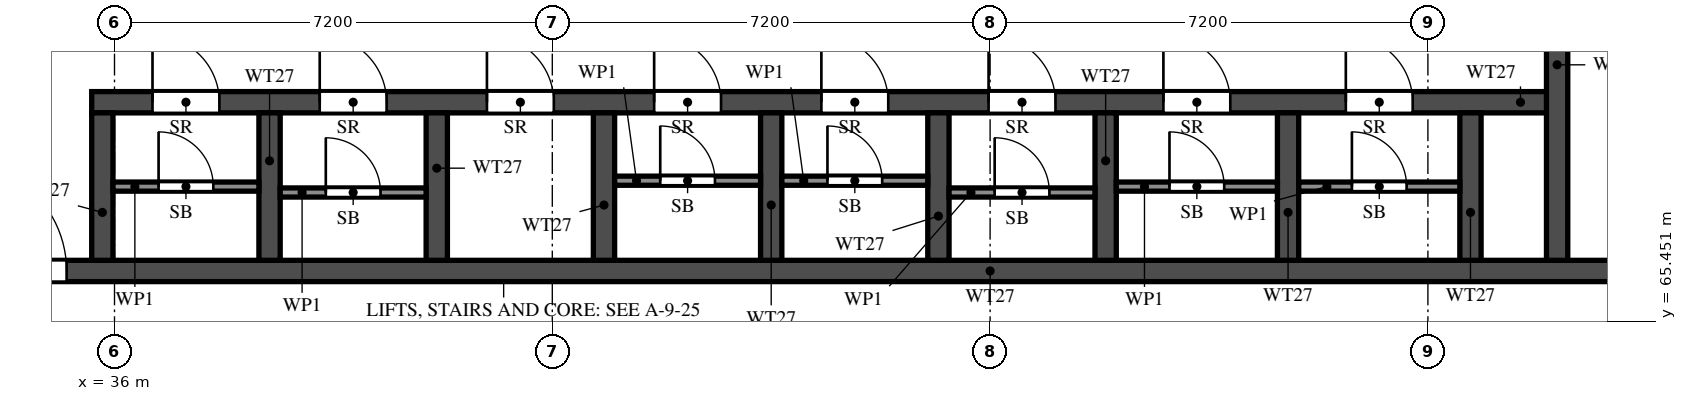
"""IFC4 building model, lengths in metres.
Left out: names, types, materials, properties, quantities, classifications, styles, units other than length and angle.
Written with IfcOpenShell. Run it as: python <this file> out.ifc"""

import sys

from ifc_helpers import new_model, si_unit, direction, frame, frame_2d, origin, place, context, subcontext, project, spatial, rectangle, extrude, element, fill, save


model = new_model("IFC4")
c1 = context("Model", 3, precision=1e-05, world=origin(), true_north=direction((0.0, 1.0)))
c2 = subcontext(c1, "Body", "Model", "MODEL_VIEW")
j1 = project(units=[si_unit("LENGTHUNIT", "METRE"), si_unit("PLANEANGLEUNIT", "RADIAN")], contexts=[c1])
p1 = place(None, origin())
s1 = spatial("IfcSite", under=j1, at=p1, CompositionType="ELEMENT")
p2 = place(p1, origin())
s2 = spatial("IfcBuilding", under=s1, at=p2, CompositionType="ELEMENT")
p3 = place(p2, frame((0.0, 0.0, 192.0)))
s3 = spatial("IfcBuildingStorey", under=s2, at=p3, CompositionType="ELEMENT", Elevation=192.0)
p4 = place(p3, frame((29.7, 66.275, 0.0), z_axis=(0.0, 0.0, 1.0), x_axis=(1.0, 0.0, 0.0)))
e1 = element("IfcWall", 1, at=p4, inside=s3, PredefinedType="SHEAR", context=c2, shape_type="SweptSolid", body=[
    extrude(rectangle(XDim=41.4, YDim=0.35, at=frame_2d((20.7, 0.0))), origin(), (0.0, 0.0, 1.0), 3.2),
])
p5 = place(p4, frame((0.925, 0.0, 0.0)))
e2 = element("IfcOpeningElement", 2, at=p5, cuts=e1, PredefinedType="OPENING", context=c2, shape_type="SweptSolid", body=[
    extrude(rectangle(XDim=1.1, YDim=2.1, at=frame_2d((0.55, 1.05))), frame((0.0, 0.185, 0.0), z_axis=(0.0, -1.0, 0.0), x_axis=(1.0, 0.0, 0.0)), (0.0, 0.0, 1.0), 0.37),
])
p6 = place(p4, frame((3.712, 0.0, 0.0)))
e3 = element("IfcOpeningElement", 3, at=p6, cuts=e1, PredefinedType="OPENING", context=c2, shape_type="SweptSolid", body=[
    extrude(rectangle(XDim=1.8, YDim=2.1, at=frame_2d((0.9, 1.05))), frame((0.0, 0.185, 0.0), z_axis=(0.0, -1.0, 0.0), x_axis=(1.0, 0.0, 0.0)), (0.0, 0.0, 1.0), 0.37),
])
p7 = place(p3, frame((35.625, 69.05, 0.0), z_axis=(0.0, 0.0, 1.0), x_axis=(1.0, 0.0, 0.0)))
e4 = element("IfcWall", 4, at=p7, inside=s3, PredefinedType="SHEAR", context=c2, shape_type="SweptSolid", body=[
    extrude(rectangle(XDim=24.1, YDim=0.35, at=frame_2d((12.05, 0.0))), origin(), (0.0, 0.0, 1.0), 3.2),
])
p8 = place(p7, frame((1.0, 0.0, 0.0)))
e5 = element("IfcOpeningElement", 5, at=p8, cuts=e4, PredefinedType="OPENING", context=c2, shape_type="SweptSolid", body=[
    extrude(rectangle(XDim=1.1, YDim=2.1, at=frame_2d((0.55, 1.05))), frame((0.0, 0.185, 0.0), z_axis=(0.0, -1.0, 0.0), x_axis=(1.0, 0.0, 0.0)), (0.0, 0.0, 1.0), 0.37),
])
p9 = place(p7, frame((3.75, 0.0, 0.0)))
e6 = element("IfcOpeningElement", 6, at=p9, cuts=e4, PredefinedType="OPENING", context=c2, shape_type="SweptSolid", body=[
    extrude(rectangle(XDim=1.1, YDim=2.1, at=frame_2d((0.55, 1.05))), frame((0.0, 0.185, 0.0), z_axis=(0.0, -1.0, 0.0), x_axis=(1.0, 0.0, 0.0)), (0.0, 0.0, 1.0), 0.37),
])
p10 = place(p7, frame((6.5, 0.0, 0.0)))
e7 = element("IfcOpeningElement", 7, at=p10, cuts=e4, PredefinedType="OPENING", context=c2, shape_type="SweptSolid", body=[
    extrude(rectangle(XDim=1.1, YDim=2.1, at=frame_2d((0.55, 1.05))), frame((0.0, 0.185, 0.0), z_axis=(0.0, -1.0, 0.0), x_axis=(1.0, 0.0, 0.0)), (0.0, 0.0, 1.0), 0.37),
])
p11 = place(p7, frame((9.25, 0.0, 0.0)))
e8 = element("IfcOpeningElement", 8, at=p11, cuts=e4, PredefinedType="OPENING", context=c2, shape_type="SweptSolid", body=[
    extrude(rectangle(XDim=1.1, YDim=2.1, at=frame_2d((0.55, 1.05))), frame((0.0, 0.185, 0.0), z_axis=(0.0, -1.0, 0.0), x_axis=(1.0, 0.0, 0.0)), (0.0, 0.0, 1.0), 0.37),
])
p12 = place(p7, frame((12.0, 0.0, 0.0)))
e9 = element("IfcOpeningElement", 9, at=p12, cuts=e4, PredefinedType="OPENING", context=c2, shape_type="SweptSolid", body=[
    extrude(rectangle(XDim=1.1, YDim=2.1, at=frame_2d((0.55, 1.05))), frame((0.0, 0.185, 0.0), z_axis=(0.0, -1.0, 0.0), x_axis=(1.0, 0.0, 0.0)), (0.0, 0.0, 1.0), 0.37),
])
p13 = place(p7, frame((14.75, 0.0, 0.0)))
e10 = element("IfcOpeningElement", 10, at=p13, cuts=e4, PredefinedType="OPENING", context=c2, shape_type="SweptSolid", body=[
    extrude(rectangle(XDim=1.1, YDim=2.1, at=frame_2d((0.55, 1.05))), frame((0.0, 0.185, 0.0), z_axis=(0.0, -1.0, 0.0), x_axis=(1.0, 0.0, 0.0)), (0.0, 0.0, 1.0), 0.37),
])
p14 = place(p7, frame((17.625, 0.0, 0.0)))
e11 = element("IfcOpeningElement", 11, at=p14, cuts=e4, PredefinedType="OPENING", context=c2, shape_type="SweptSolid", body=[
    extrude(rectangle(XDim=1.1, YDim=2.1, at=frame_2d((0.55, 1.05))), frame((0.0, 0.185, 0.0), z_axis=(0.0, -1.0, 0.0), x_axis=(1.0, 0.0, 0.0)), (0.0, 0.0, 1.0), 0.37),
])
p15 = place(p7, frame((20.625, 0.0, 0.0)))
e12 = element("IfcOpeningElement", 12, at=p15, cuts=e4, PredefinedType="OPENING", context=c2, shape_type="SweptSolid", body=[
    extrude(rectangle(XDim=1.1, YDim=2.1, at=frame_2d((0.55, 1.05))), frame((0.0, 0.185, 0.0), z_axis=(0.0, -1.0, 0.0), x_axis=(1.0, 0.0, 0.0)), (0.0, 0.0, 1.0), 0.37),
])
p16 = place(p3, frame((59.725, 66.45, 0.0), z_axis=(0.0, 0.0, 1.0), x_axis=(0.0, 1.0, 0.0)))
e13 = element("IfcWall", 13, at=p16, inside=s3, PredefinedType="SHEAR", context=c2, shape_type="SweptSolid", body=[
    extrude(rectangle(XDim=6.125, YDim=0.35, at=frame_2d((3.062, 0.0))), origin(), (0.0, 0.0, 1.0), 3.2),
])
p17 = place(p16, frame((3.85, 0.0, 0.0)))
e14 = element("IfcOpeningElement", 14, at=p17, cuts=e13, PredefinedType="OPENING", context=c2, shape_type="SweptSolid", body=[
    extrude(rectangle(XDim=1.2, YDim=2.1, at=frame_2d((0.6, 1.05))), frame((0.0, 0.185, 0.0), z_axis=(0.0, -1.0, 0.0), x_axis=(1.0, 0.0, 0.0)), (0.0, 0.0, 1.0), 0.37),
])
for number, where, z_axis, x_axis in (
    (15, (35.8, 66.45, 0.0), (0.0, 0.0, 1.0), (0.0, 1.0, 0.0)),
    (16, (38.55, 66.45, 0.0), (0.0, 0.0, 1.0), (0.0, 1.0, 0.0)),
    (17, (41.3, 66.45, 0.0), (0.0, 0.0, 1.0), (0.0, 1.0, 0.0)),
    (18, (44.05, 66.45, 0.0), (0.0, 0.0, 1.0), (0.0, 1.0, 0.0)),
    (19, (46.8, 66.45, 0.0), (0.0, 0.0, 1.0), (0.0, 1.0, 0.0)),
    (20, (49.55, 66.45, 0.0), (0.0, 0.0, 1.0), (0.0, 1.0, 0.0)),
    (21, (52.3, 66.45, 0.0), (0.0, 0.0, 1.0), (0.0, 1.0, 0.0)),
    (22, (55.3, 66.45, 0.0), (0.0, 0.0, 1.0), (0.0, 1.0, 0.0)),
    (23, (58.3, 66.45, 0.0), (0.0, 0.0, 1.0), (0.0, 1.0, 0.0)),
):
    element("IfcWall", number, at=place(p3, frame(where, z_axis=z_axis, x_axis=x_axis)), inside=s3, PredefinedType="SHEAR", context=c2, shape_type="SweptSolid", body=[
        extrude(rectangle(XDim=2.425, YDim=0.35, at=frame_2d((1.212, 0.0))), origin(), (0.0, 0.0, 1.0), 3.2),
    ])
p18 = place(p3, frame((35.975, 67.663, 0.0), z_axis=(0.0, 0.0, 1.0), x_axis=(1.0, 0.0, 0.0)))
e24 = element("IfcWall", 24, at=p18, inside=s3, PredefinedType="PARTITIONING", context=c2, shape_type="SweptSolid", body=[
    extrude(rectangle(XDim=2.4, YDim=0.15, at=frame_2d((1.2, 0.0))), origin(), (0.0, 0.0, 1.0), 3.2),
])
p19 = place(p18, frame((0.75, 0.0, 0.0)))
e25 = element("IfcOpeningElement", 25, at=p19, cuts=e24, PredefinedType="OPENING", context=c2, shape_type="SweptSolid", body=[
    extrude(rectangle(XDim=0.9, YDim=2.1, at=frame_2d((0.45, 1.05))), frame((0.0, 0.085, 0.0), z_axis=(0.0, -1.0, 0.0), x_axis=(1.0, 0.0, 0.0)), (0.0, 0.0, 1.0), 0.17),
])
p20 = place(p3, frame((38.725, 67.565, 0.0), z_axis=(0.0, 0.0, 1.0), x_axis=(1.0, 0.0, 0.0)))
e26 = element("IfcWall", 26, at=p20, inside=s3, PredefinedType="PARTITIONING", context=c2, shape_type="SweptSolid", body=[
    extrude(rectangle(XDim=2.4, YDim=0.15, at=frame_2d((1.2, 0.0))), origin(), (0.0, 0.0, 1.0), 3.2),
])
p21 = place(p20, frame((0.75, 0.0, 0.0)))
e27 = element("IfcOpeningElement", 27, at=p21, cuts=e26, PredefinedType="OPENING", context=c2, shape_type="SweptSolid", body=[
    extrude(rectangle(XDim=0.9, YDim=2.1, at=frame_2d((0.45, 1.05))), frame((0.0, 0.085, 0.0), z_axis=(0.0, -1.0, 0.0), x_axis=(1.0, 0.0, 0.0)), (0.0, 0.0, 1.0), 0.17),
])
p22 = place(p3, frame((44.225, 67.76, 0.0), z_axis=(0.0, 0.0, 1.0), x_axis=(1.0, 0.0, 0.0)))
e28 = element("IfcWall", 28, at=p22, inside=s3, PredefinedType="PARTITIONING", context=c2, shape_type="SweptSolid", body=[
    extrude(rectangle(XDim=2.4, YDim=0.15, at=frame_2d((1.2, 0.0))), origin(), (0.0, 0.0, 1.0), 3.2),
])
p23 = place(p22, frame((0.75, 0.0, 0.0)))
e29 = element("IfcOpeningElement", 29, at=p23, cuts=e28, PredefinedType="OPENING", context=c2, shape_type="SweptSolid", body=[
    extrude(rectangle(XDim=0.9, YDim=2.1, at=frame_2d((0.45, 1.05))), frame((0.0, 0.085, 0.0), z_axis=(0.0, -1.0, 0.0), x_axis=(1.0, 0.0, 0.0)), (0.0, 0.0, 1.0), 0.17),
])
p24 = place(p3, frame((46.975, 67.76, 0.0), z_axis=(0.0, 0.0, 1.0), x_axis=(1.0, 0.0, 0.0)))
e30 = element("IfcWall", 30, at=p24, inside=s3, PredefinedType="PARTITIONING", context=c2, shape_type="SweptSolid", body=[
    extrude(rectangle(XDim=2.4, YDim=0.15, at=frame_2d((1.2, 0.0))), origin(), (0.0, 0.0, 1.0), 3.2),
])
p25 = place(p24, frame((0.75, 0.0, 0.0)))
e31 = element("IfcOpeningElement", 31, at=p25, cuts=e30, PredefinedType="OPENING", context=c2, shape_type="SweptSolid", body=[
    extrude(rectangle(XDim=0.9, YDim=2.1, at=frame_2d((0.45, 1.05))), frame((0.0, 0.085, 0.0), z_axis=(0.0, -1.0, 0.0), x_axis=(1.0, 0.0, 0.0)), (0.0, 0.0, 1.0), 0.17),
])
p26 = place(p3, frame((49.725, 67.565, 0.0), z_axis=(0.0, 0.0, 1.0), x_axis=(1.0, 0.0, 0.0)))
e32 = element("IfcWall", 32, at=p26, inside=s3, PredefinedType="PARTITIONING", context=c2, shape_type="SweptSolid", body=[
    extrude(rectangle(XDim=2.4, YDim=0.15, at=frame_2d((1.2, 0.0))), origin(), (0.0, 0.0, 1.0), 3.2),
])
p27 = place(p26, frame((0.75, 0.0, 0.0)))
e33 = element("IfcOpeningElement", 33, at=p27, cuts=e32, PredefinedType="OPENING", context=c2, shape_type="SweptSolid", body=[
    extrude(rectangle(XDim=0.9, YDim=2.1, at=frame_2d((0.45, 1.05))), frame((0.0, 0.085, 0.0), z_axis=(0.0, -1.0, 0.0), x_axis=(1.0, 0.0, 0.0)), (0.0, 0.0, 1.0), 0.17),
])
p28 = place(p3, frame((52.475, 67.663, 0.0), z_axis=(0.0, 0.0, 1.0), x_axis=(1.0, 0.0, 0.0)))
e34 = element("IfcWall", 34, at=p28, inside=s3, PredefinedType="PARTITIONING", context=c2, shape_type="SweptSolid", body=[
    extrude(rectangle(XDim=2.65, YDim=0.15, at=frame_2d((1.325, 0.0))), origin(), (0.0, 0.0, 1.0), 3.2),
])
p29 = place(p28, frame((0.875, 0.0, 0.0)))
e35 = element("IfcOpeningElement", 35, at=p29, cuts=e34, PredefinedType="OPENING", context=c2, shape_type="SweptSolid", body=[
    extrude(rectangle(XDim=0.9, YDim=2.1, at=frame_2d((0.45, 1.05))), frame((0.0, 0.085, 0.0), z_axis=(0.0, -1.0, 0.0), x_axis=(1.0, 0.0, 0.0)), (0.0, 0.0, 1.0), 0.17),
])
p30 = place(p3, frame((55.475, 67.663, 0.0), z_axis=(0.0, 0.0, 1.0), x_axis=(1.0, 0.0, 0.0)))
e36 = element("IfcWall", 36, at=p30, inside=s3, PredefinedType="PARTITIONING", context=c2, shape_type="SweptSolid", body=[
    extrude(rectangle(XDim=2.65, YDim=0.15, at=frame_2d((1.325, 0.0))), origin(), (0.0, 0.0, 1.0), 3.2),
])
p31 = place(p30, frame((0.875, 0.0, 0.0)))
e37 = element("IfcOpeningElement", 37, at=p31, cuts=e36, PredefinedType="OPENING", context=c2, shape_type="SweptSolid", body=[
    extrude(rectangle(XDim=0.9, YDim=2.1, at=frame_2d((0.45, 1.05))), frame((0.0, 0.085, 0.0), z_axis=(0.0, -1.0, 0.0), x_axis=(1.0, 0.0, 0.0)), (0.0, 0.0, 1.0), 0.17),
])
p32 = place(p6, origin())
e38 = element("IfcDoor", 38, at=p32, inside=s3, OperationType="DOUBLE_DOOR_SINGLE_SWING", PredefinedType="DOOR", context=c2, shape_type="SweptSolid", body=[
    extrude(rectangle(XDim=1.8, YDim=2.1, at=frame_2d((0.9, 1.05))), frame((0.0, 0.025, 0.0), z_axis=(0.0, -1.0, 0.0), x_axis=(1.0, 0.0, 0.0)), (0.0, 0.0, 1.0), 0.05),
])
fill(e3, e38)
p33 = place(p8, origin())
e39 = element("IfcDoor", 39, at=p33, inside=s3, OperationType="SINGLE_SWING_RIGHT", PredefinedType="DOOR", context=c2, shape_type="SweptSolid", body=[
    extrude(rectangle(XDim=1.1, YDim=2.1, at=frame_2d((0.55, 1.05))), frame((0.0, 0.025, 0.0), z_axis=(0.0, -1.0, 0.0), x_axis=(1.0, 0.0, 0.0)), (0.0, 0.0, 1.0), 0.05),
])
fill(e5, e39)
p34 = place(p19, origin())
e40 = element("IfcDoor", 40, at=p34, inside=s3, OperationType="SINGLE_SWING_RIGHT", PredefinedType="DOOR", context=c2, shape_type="SweptSolid", body=[
    extrude(rectangle(XDim=0.9, YDim=2.1, at=frame_2d((0.45, 1.05))), frame((0.0, 0.025, 0.0), z_axis=(0.0, -1.0, 0.0), x_axis=(1.0, 0.0, 0.0)), (0.0, 0.0, 1.0), 0.05),
])
fill(e25, e40)
p35 = place(p9, origin())
e41 = element("IfcDoor", 41, at=p35, inside=s3, OperationType="SINGLE_SWING_LEFT", PredefinedType="DOOR", context=c2, shape_type="SweptSolid", body=[
    extrude(rectangle(XDim=1.1, YDim=2.1, at=frame_2d((0.55, 1.05))), frame((0.0, 0.025, 0.0), z_axis=(0.0, -1.0, 0.0), x_axis=(1.0, 0.0, 0.0)), (0.0, 0.0, 1.0), 0.05),
])
fill(e6, e41)
p36 = place(p21, origin())
e42 = element("IfcDoor", 42, at=p36, inside=s3, OperationType="SINGLE_SWING_LEFT", PredefinedType="DOOR", context=c2, shape_type="SweptSolid", body=[
    extrude(rectangle(XDim=0.9, YDim=2.1, at=frame_2d((0.45, 1.05))), frame((0.0, 0.025, 0.0), z_axis=(0.0, -1.0, 0.0), x_axis=(1.0, 0.0, 0.0)), (0.0, 0.0, 1.0), 0.05),
])
fill(e27, e42)
p37 = place(p10, origin())
e43 = element("IfcDoor", 43, at=p37, inside=s3, OperationType="SINGLE_SWING_RIGHT", PredefinedType="DOOR", context=c2, shape_type="SweptSolid", body=[
    extrude(rectangle(XDim=1.1, YDim=2.1, at=frame_2d((0.55, 1.05))), frame((0.0, 0.025, 0.0), z_axis=(0.0, -1.0, 0.0), x_axis=(1.0, 0.0, 0.0)), (0.0, 0.0, 1.0), 0.05),
])
fill(e7, e43)
p38 = place(p11, origin())
e44 = element("IfcDoor", 44, at=p38, inside=s3, OperationType="SINGLE_SWING_LEFT", PredefinedType="DOOR", context=c2, shape_type="SweptSolid", body=[
    extrude(rectangle(XDim=1.1, YDim=2.1, at=frame_2d((0.55, 1.05))), frame((0.0, 0.025, 0.0), z_axis=(0.0, -1.0, 0.0), x_axis=(1.0, 0.0, 0.0)), (0.0, 0.0, 1.0), 0.05),
])
fill(e8, e44)
p39 = place(p23, origin())
e45 = element("IfcDoor", 45, at=p39, inside=s3, OperationType="SINGLE_SWING_RIGHT", PredefinedType="DOOR", context=c2, shape_type="SweptSolid", body=[
    extrude(rectangle(XDim=0.9, YDim=2.1, at=frame_2d((0.45, 1.05))), frame((0.0, 0.025, 0.0), z_axis=(0.0, -1.0, 0.0), x_axis=(1.0, 0.0, 0.0)), (0.0, 0.0, 1.0), 0.05),
])
fill(e29, e45)
p40 = place(p12, origin())
e46 = element("IfcDoor", 46, at=p40, inside=s3, OperationType="SINGLE_SWING_RIGHT", PredefinedType="DOOR", context=c2, shape_type="SweptSolid", body=[
    extrude(rectangle(XDim=1.1, YDim=2.1, at=frame_2d((0.55, 1.05))), frame((0.0, 0.025, 0.0), z_axis=(0.0, -1.0, 0.0), x_axis=(1.0, 0.0, 0.0)), (0.0, 0.0, 1.0), 0.05),
])
fill(e9, e46)
p41 = place(p25, origin())
e47 = element("IfcDoor", 47, at=p41, inside=s3, OperationType="SINGLE_SWING_LEFT", PredefinedType="DOOR", context=c2, shape_type="SweptSolid", body=[
    extrude(rectangle(XDim=0.9, YDim=2.1, at=frame_2d((0.45, 1.05))), frame((0.0, 0.025, 0.0), z_axis=(0.0, -1.0, 0.0), x_axis=(1.0, 0.0, 0.0)), (0.0, 0.0, 1.0), 0.05),
])
fill(e31, e47)
p42 = place(p13, origin())
e48 = element("IfcDoor", 48, at=p42, inside=s3, OperationType="SINGLE_SWING_LEFT", PredefinedType="DOOR", context=c2, shape_type="SweptSolid", body=[
    extrude(rectangle(XDim=1.1, YDim=2.1, at=frame_2d((0.55, 1.05))), frame((0.0, 0.025, 0.0), z_axis=(0.0, -1.0, 0.0), x_axis=(1.0, 0.0, 0.0)), (0.0, 0.0, 1.0), 0.05),
])
fill(e10, e48)
p43 = place(p27, origin())
e49 = element("IfcDoor", 49, at=p43, inside=s3, OperationType="SINGLE_SWING_LEFT", PredefinedType="DOOR", context=c2, shape_type="SweptSolid", body=[
    extrude(rectangle(XDim=0.9, YDim=2.1, at=frame_2d((0.45, 1.05))), frame((0.0, 0.025, 0.0), z_axis=(0.0, -1.0, 0.0), x_axis=(1.0, 0.0, 0.0)), (0.0, 0.0, 1.0), 0.05),
])
fill(e33, e49)
p44 = place(p14, origin())
e50 = element("IfcDoor", 50, at=p44, inside=s3, OperationType="SINGLE_SWING_RIGHT", PredefinedType="DOOR", context=c2, shape_type="SweptSolid", body=[
    extrude(rectangle(XDim=1.1, YDim=2.1, at=frame_2d((0.55, 1.05))), frame((0.0, 0.025, 0.0), z_axis=(0.0, -1.0, 0.0), x_axis=(1.0, 0.0, 0.0)), (0.0, 0.0, 1.0), 0.05),
])
fill(e11, e50)
p45 = place(p29, origin())
e51 = element("IfcDoor", 51, at=p45, inside=s3, OperationType="SINGLE_SWING_LEFT", PredefinedType="DOOR", context=c2, shape_type="SweptSolid", body=[
    extrude(rectangle(XDim=0.9, YDim=2.1, at=frame_2d((0.45, 1.05))), frame((0.0, 0.025, 0.0), z_axis=(0.0, -1.0, 0.0), x_axis=(1.0, 0.0, 0.0)), (0.0, 0.0, 1.0), 0.05),
])
fill(e35, e51)
p46 = place(p15, origin())
e52 = element("IfcDoor", 52, at=p46, inside=s3, OperationType="SINGLE_SWING_RIGHT", PredefinedType="DOOR", context=c2, shape_type="SweptSolid", body=[
    extrude(rectangle(XDim=1.1, YDim=2.1, at=frame_2d((0.55, 1.05))), frame((0.0, 0.025, 0.0), z_axis=(0.0, -1.0, 0.0), x_axis=(1.0, 0.0, 0.0)), (0.0, 0.0, 1.0), 0.05),
])
fill(e12, e52)
p47 = place(p31, origin())
e53 = element("IfcDoor", 53, at=p47, inside=s3, OperationType="SINGLE_SWING_LEFT", PredefinedType="DOOR", context=c2, shape_type="SweptSolid", body=[
    extrude(rectangle(XDim=0.9, YDim=2.1, at=frame_2d((0.45, 1.05))), frame((0.0, 0.025, 0.0), z_axis=(0.0, -1.0, 0.0), x_axis=(1.0, 0.0, 0.0)), (0.0, 0.0, 1.0), 0.05),
])
fill(e37, e53)
save(model, sys.argv[1])
